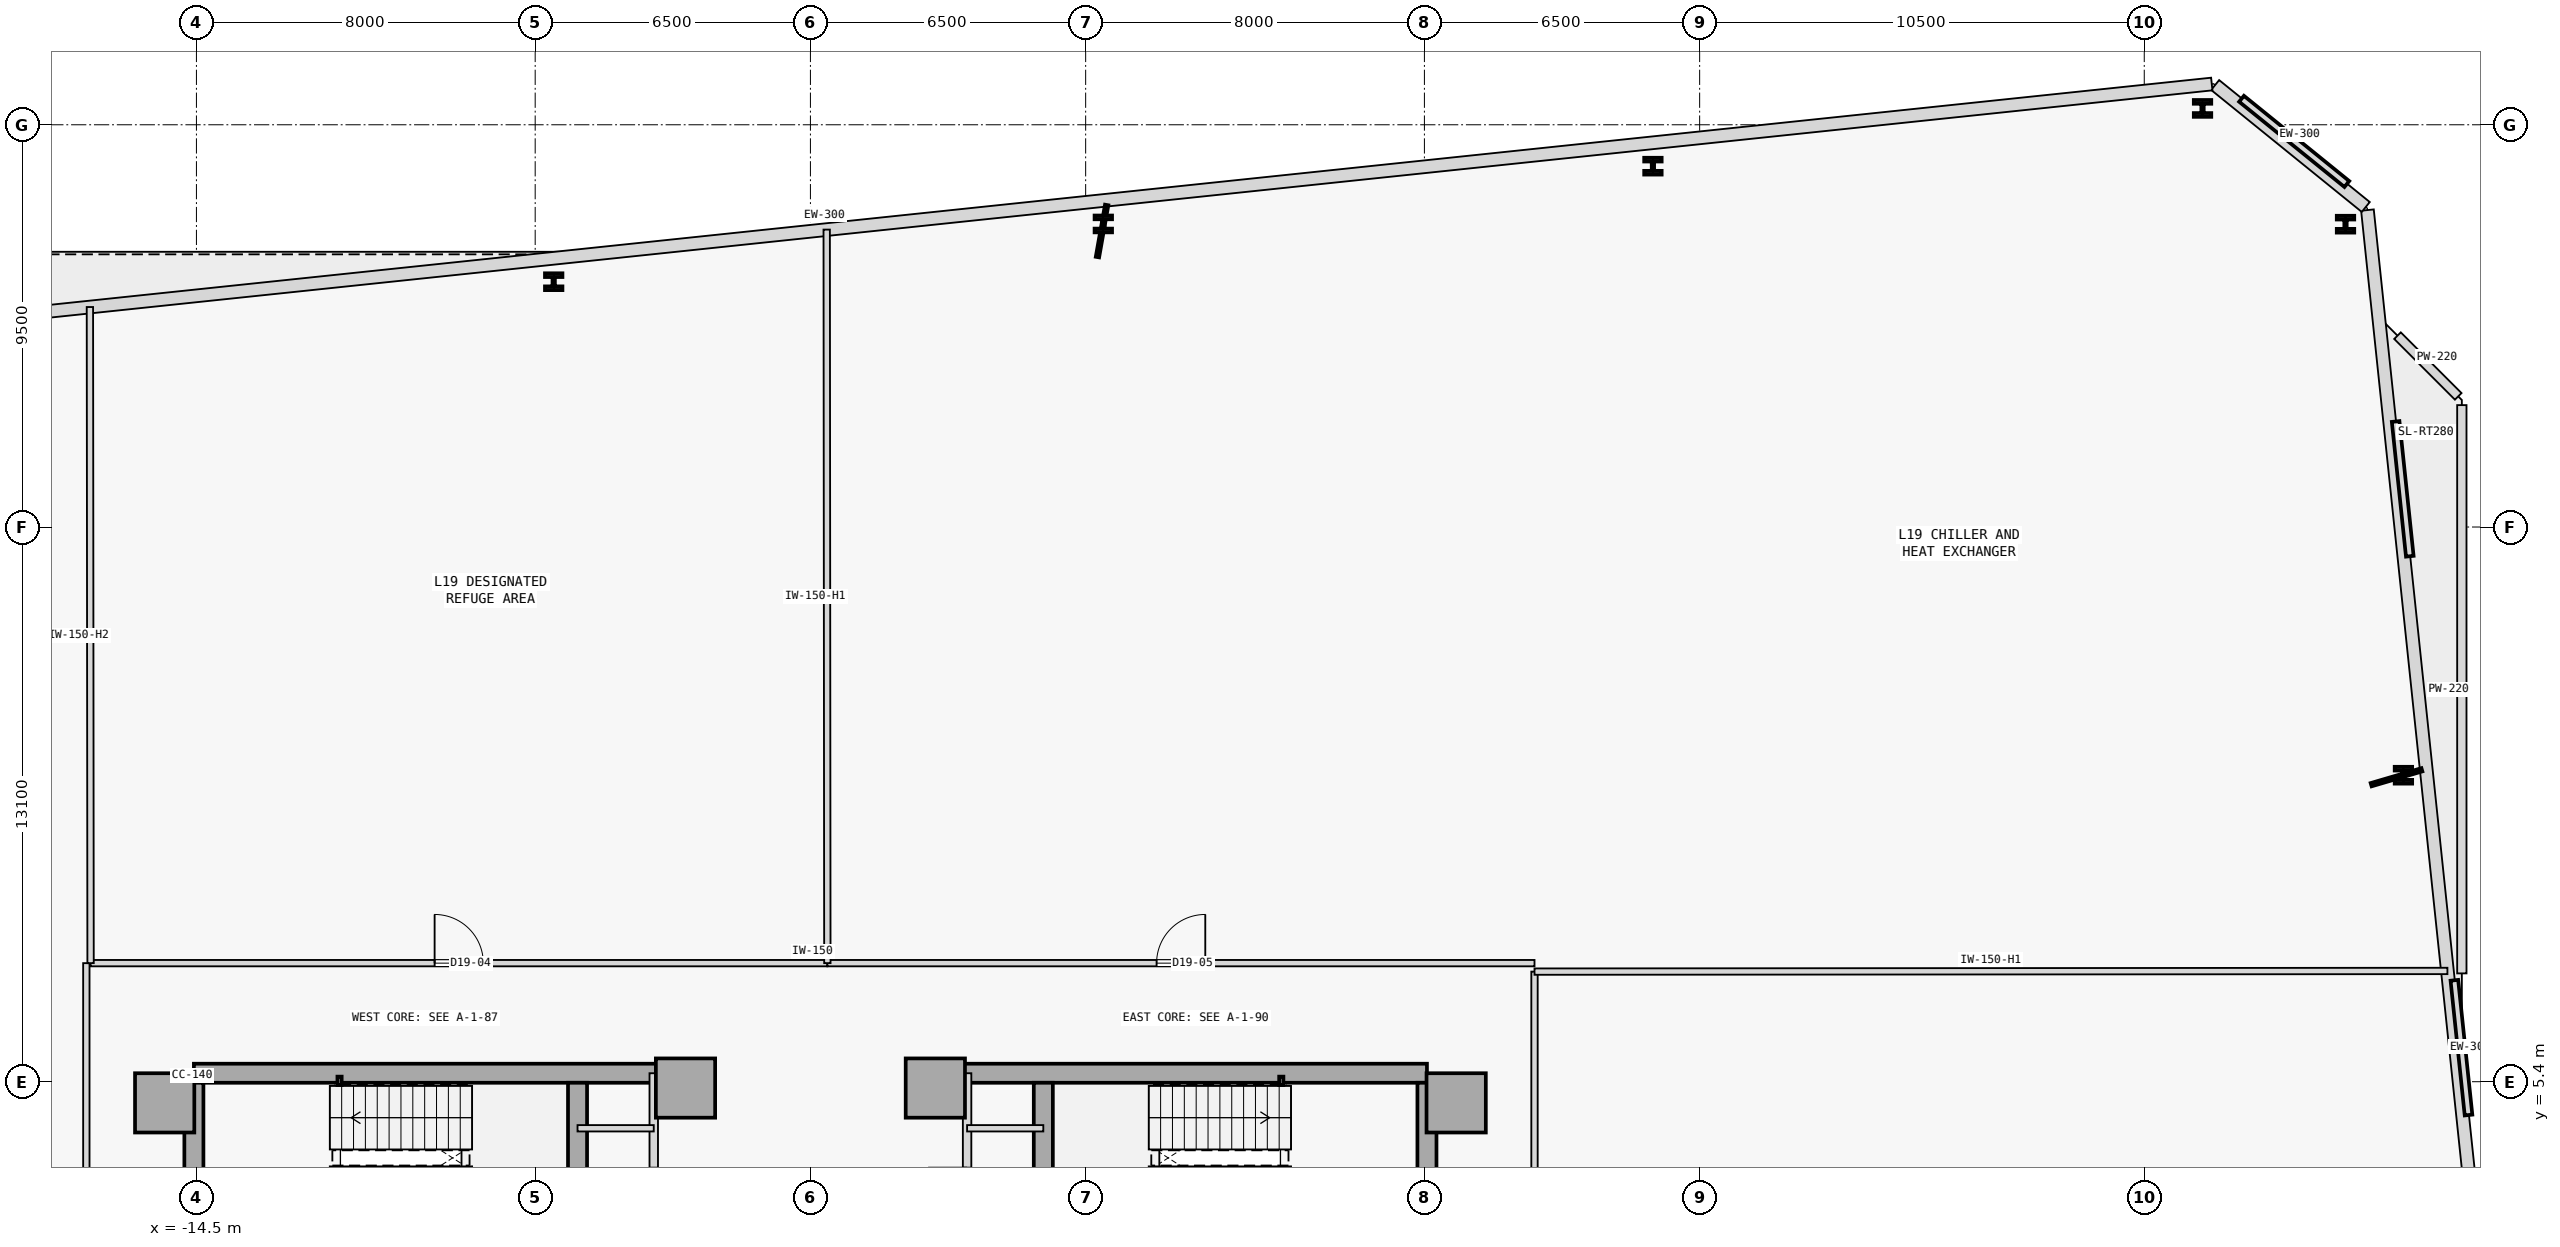
"""IFC4 building model, lengths in metres.
Left out: names, types, materials, properties, quantities, classifications, styles, units other than length and angle.
Written with IfcOpenShell. Run it as: python <this file> out.ifc"""

import sys

from ifc_helpers import new_model, si_unit, direction, frame, frame_2d, origin, origin_2d, place, context, subcontext, project, spatial, rectangle, hollow_rectangle, i_section, extrude, element, fill, save


model = new_model("IFC4")
c1 = context("Model", 3, precision=1e-05, world=origin(), true_north=direction((0.0, 1.0)))
c2 = subcontext(c1, "Body", "Model", "MODEL_VIEW")
j1 = project(units=[si_unit("LENGTHUNIT", "METRE"), si_unit("PLANEANGLEUNIT", "RADIAN")], contexts=[c1])
p1 = place(None, origin())
s1 = spatial("IfcSite", under=j1, at=p1, CompositionType="ELEMENT")
p2 = place(p1, origin())
s2 = spatial("IfcBuilding", under=s1, at=p2, CompositionType="ELEMENT")
p3 = place(p2, frame((0.0, 0.0, 78.8)))
s3 = spatial("IfcBuildingStorey", under=s2, at=p3, CompositionType="ELEMENT", Elevation=78.8)
for number, where, z_axis, x_axis in (
    (1, (-15.25, 4.9, 0.0), (0.0, 0.0, 1.0), (1.0, 0.0, 0.0)),
    (2, (-2.95, 5.25, 0.0), (0.0, 0.0, 1.0), (1.0, 0.0, 0.0)),
    (3, (15.25, 4.9, 0.0), (0.0, 0.0, 1.0), (1.0, 0.0, 0.0)),
    (4, (2.95, 5.25, 0.0), (0.0, 0.0, 1.0), (1.0, 0.0, 0.0)),
):
    element("IfcColumn", number, at=place(p3, frame(where, z_axis=z_axis, x_axis=x_axis)), inside=s3, PredefinedType="COLUMN", context=c2, shape_type="SweptSolid", body=[
        extrude(rectangle(XDim=1.4, YDim=1.4, at=origin_2d()), origin(), (0.0, 0.0, 1.0), 4.4),
    ])
p4 = place(p3, frame((-14.56, 5.6, 0.0), z_axis=(0.0, 0.0, 1.0), x_axis=(1.0, 0.0, 0.0)))
e5 = element("IfcWall", 5, at=p4, inside=s3, PredefinedType="SHEAR", context=c2, shape_type="SweptSolid", body=[
    extrude(rectangle(XDim=11.41, YDim=0.45, at=frame_2d((5.705, 0.0))), origin(), (0.0, 0.0, 1.0), 4.15),
])
p5 = place(p3, frame((-14.56, -5.375, 0.0), z_axis=(0.0, 0.0, 1.0), x_axis=(0.0, 1.0, 0.0)))
e6 = element("IfcWall", 6, at=p5, inside=s3, PredefinedType="SHEAR", context=c2, shape_type="SweptSolid", body=[
    extrude(rectangle(XDim=10.75, YDim=0.45, at=frame_2d((5.375, 0.0))), origin(), (0.0, 0.0, 1.0), 4.15),
])
p6 = place(p3, frame((-5.5, 2.15, 0.0), z_axis=(0.0, 0.0, 1.0), x_axis=(0.0, 1.0, 0.0)))
e7 = element("IfcWall", 7, at=p6, inside=s3, PredefinedType="SHEAR", context=c2, shape_type="SweptSolid", body=[
    extrude(rectangle(XDim=3.225, YDim=0.45, at=frame_2d((1.613, 0.0))), origin(), (0.0, 0.0, 1.0), 4.15),
])
p7 = place(p3, frame((3.15, 5.6, 0.0), z_axis=(0.0, 0.0, 1.0), x_axis=(1.0, 0.0, 0.0)))
e8 = element("IfcWall", 8, at=p7, inside=s3, PredefinedType="SHEAR", context=c2, shape_type="SweptSolid", body=[
    extrude(rectangle(XDim=11.41, YDim=0.45, at=frame_2d((5.705, 0.0))), origin(), (0.0, 0.0, 1.0), 4.15),
])
p8 = place(p3, frame((14.56, -5.375, 0.0), z_axis=(0.0, 0.0, 1.0), x_axis=(0.0, 1.0, 0.0)))
e9 = element("IfcWall", 9, at=p8, inside=s3, PredefinedType="SHEAR", context=c2, shape_type="SweptSolid", body=[
    extrude(rectangle(XDim=10.75, YDim=0.45, at=frame_2d((5.375, 0.0))), origin(), (0.0, 0.0, 1.0), 4.15),
])
p9 = place(p3, frame((5.5, 2.15, 0.0), z_axis=(0.0, 0.0, 1.0), x_axis=(0.0, 1.0, 0.0)))
e10 = element("IfcWall", 10, at=p9, inside=s3, PredefinedType="SHEAR", context=c2, shape_type="SweptSolid", body=[
    extrude(rectangle(XDim=3.225, YDim=0.45, at=frame_2d((1.613, 0.0))), origin(), (0.0, 0.0, 1.0), 4.15),
])
for number, where, z_axis, x_axis in (
    (11, (-11.12, 5.42, 0.0), (0.0, 0.0, 1.0), (1.0, 0.0, 0.0)),
    (12, (11.12, 5.42, 0.0), (0.0, 0.0, 1.0), (1.0, 0.0, 0.0)),
):
    element("IfcColumn", number, at=place(p3, frame(where, z_axis=z_axis, x_axis=x_axis)), inside=s3, PredefinedType="COLUMN", context=c2, shape_type="SweptSolid", body=[
        extrude(hollow_rectangle(XDim=0.1, YDim=0.2, WallThickness=0.008, at=origin_2d()), origin(), (0.0, 0.0, 1.0), 4.4),
    ])
for number, where, z_axis, x_axis in (
    (13, (37.621, 12.638, 0.0), (0.0, 0.0, 1.0), (1.0, 0.0, 0.0)),
    (14, (36.253, 25.652, 0.0), (0.0, 0.0, 1.0), (1.0, 0.0, 0.0)),
    (15, (32.876, 28.386, 0.0), (0.0, 0.0, 1.0), (1.0, 0.0, 0.0)),
    (16, (19.897, 27.022, 0.0), (0.0, 0.0, 1.0), (1.0, 0.0, 0.0)),
    (17, (6.917, 25.658, 0.0), (0.0, 0.0, 1.0), (1.0, 0.0, 0.0)),
    (18, (-6.062, 24.293, 0.0), (0.0, 0.0, 1.0), (1.0, 0.0, 0.0)),
):
    element("IfcColumn", number, at=place(p3, frame(where, z_axis=z_axis, x_axis=x_axis)), inside=s3, PredefinedType="COLUMN", context=c2, shape_type="SweptSolid", body=[
        extrude(i_section(OverallWidth=0.413, OverallDepth=0.398, WebThickness=0.056, FlangeThickness=0.089, FilletRadius=0.015, at=origin_2d()), origin(), (0.0, 0.0, 1.0), 4.4),
    ])
p10 = place(p3, frame((39.0, 7.958, 0.0), z_axis=(0.0, 0.0, 1.0), x_axis=(0.0, 1.0, 0.0)))
e19 = element("IfcWall", 19, at=p10, inside=s3, PredefinedType="PARAPET", context=c2, shape_type="SweptSolid", body=[
    extrude(rectangle(XDim=13.421, YDim=0.22, at=frame_2d((6.71, 0.0))), origin(), (0.0, 0.0, 1.0), 1.2),
])
p11 = place(p3, frame((38.914, 21.586, 0.0), z_axis=(0.0, 0.0, 1.0), x_axis=(-0.707106781187, 0.707106781187, 0.0)))
e20 = element("IfcWall", 20, at=p11, inside=s3, PredefinedType="PARAPET", context=c2, shape_type="SweptSolid", body=[
    extrude(rectangle(XDim=2.027, YDim=0.22, at=frame_2d((1.014, 0.0))), origin(), (0.0, 0.0, 1.0), 1.2),
])
p12 = place(p3, frame((40.932, -13.607, 0.0), z_axis=(0.0, 0.0, 1.0), x_axis=(-0.104531231484, 0.994521604413, 0.0)))
e21 = element("IfcWall", 21, at=p12, inside=s3, PredefinedType="STANDARD", context=c2, shape_type="SweptSolid", body=[
    extrude(rectangle(XDim=39.81, YDim=0.3, at=frame_2d((19.905, 0.0))), origin(), (0.0, 0.0, 1.0), 4.15),
])
p13 = place(p3, frame((36.731, 26.058, 0.0), z_axis=(0.0, 0.0, 1.0), x_axis=(-0.777139271876, 0.629328651904, 0.0)))
e22 = element("IfcWall", 22, at=p13, inside=s3, PredefinedType="STANDARD", context=c2, shape_type="SweptSolid", body=[
    extrude(rectangle(XDim=4.577, YDim=0.3, at=frame_2d((2.289, 0.0))), origin(), (0.0, 0.0, 1.0), 4.15),
])
p14 = place(p3, frame((33.094, 28.962, 0.0), z_axis=(0.0, 0.0, 1.0), x_axis=(-0.994521682676, -0.104530486878, 0.0)))
e23 = element("IfcWall", 23, at=p14, inside=s3, PredefinedType="STANDARD", context=c2, shape_type="SweptSolid", body=[
    extrude(rectangle(XDim=65.81, YDim=0.3, at=frame_2d((32.905, 0.0))), origin(), (0.0, 0.0, 1.0), 4.15),
])
p15 = place(p14, frame((61.35, 0.0, 0.0)))
e24 = element("IfcOpeningElement", 24, at=p15, cuts=e23, PredefinedType="OPENING", context=c2, shape_type="SweptSolid", body=[
    extrude(rectangle(XDim=1.1, YDim=2.2, at=frame_2d((0.55, 1.1))), frame((0.0, 0.16, 0.0), z_axis=(0.0, -1.0, 0.0), x_axis=(1.0, 0.0, 0.0)), (0.0, 0.0, 1.0), 0.32),
])
p16 = place(p3, frame((-3.7, -1.15, 0.0), z_axis=(0.0, 0.0, 1.0), x_axis=(0.0, 1.0, 0.0)))
e25 = element("IfcWall", 25, at=p16, inside=s3, PredefinedType="STANDARD", context=c2, shape_type="SweptSolid", body=[
    extrude(rectangle(XDim=6.75, YDim=0.2, at=frame_2d((3.375, 0.0))), origin(), (0.0, 0.0, 1.0), 4.15),
])
p17 = place(p16, frame((3.6, 0.0, 0.0)))
e26 = element("IfcOpeningElement", 26, at=p17, cuts=e25, PredefinedType="OPENING", context=c2, shape_type="SweptSolid", body=[
    extrude(rectangle(XDim=0.92, YDim=2.15, at=frame_2d((0.46, 1.075))), frame((0.0, 0.11, 0.0), z_axis=(0.0, -1.0, 0.0), x_axis=(1.0, 0.0, 0.0)), (0.0, 0.0, 1.0), 0.22),
])
p18 = place(p16, frame((0.85, 0.0, 0.0)))
e27 = element("IfcOpeningElement", 27, at=p18, cuts=e25, PredefinedType="OPENING", context=c2, shape_type="SweptSolid", body=[
    extrude(rectangle(XDim=0.9, YDim=2.15, at=frame_2d((0.45, 1.075))), frame((0.0, 0.11, 0.0), z_axis=(0.0, -1.0, 0.0), x_axis=(1.0, 0.0, 0.0)), (0.0, 0.0, 1.0), 0.22),
])
p19 = place(p3, frame((3.7, -1.15, 0.0), z_axis=(0.0, 0.0, 1.0), x_axis=(0.0, 1.0, 0.0)))
e28 = element("IfcWall", 28, at=p19, inside=s3, PredefinedType="STANDARD", context=c2, shape_type="SweptSolid", body=[
    extrude(rectangle(XDim=6.75, YDim=0.2, at=frame_2d((3.375, 0.0))), origin(), (0.0, 0.0, 1.0), 4.15),
])
p20 = place(p19, frame((3.6, 0.0, 0.0)))
e29 = element("IfcOpeningElement", 29, at=p20, cuts=e28, PredefinedType="OPENING", context=c2, shape_type="SweptSolid", body=[
    extrude(rectangle(XDim=0.92, YDim=2.15, at=frame_2d((0.46, 1.075))), frame((0.0, 0.11, 0.0), z_axis=(0.0, -1.0, 0.0), x_axis=(1.0, 0.0, 0.0)), (0.0, 0.0, 1.0), 0.22),
])
for number, where, z_axis, x_axis in (
    (30, (-5.5, 4.3, 0.0), (0.0, 0.0, 1.0), (1.0, 0.0, 0.0)),
    (31, (3.7, 4.3, 0.0), (0.0, 0.0, 1.0), (1.0, 0.0, 0.0)),
):
    element("IfcWall", number, at=place(p3, frame(where, z_axis=z_axis, x_axis=x_axis)), inside=s3, PredefinedType="PARTITIONING", context=c2, shape_type="SweptSolid", body=[
        extrude(rectangle(XDim=1.8, YDim=0.15, at=frame_2d((0.9, 0.0))), origin(), (0.0, 0.0, 1.0), 4.15),
    ])
p21 = place(p3, frame((-17.0, 8.2, 0.0), z_axis=(0.0, 0.0, 1.0), x_axis=(1.0, 0.0, 0.0)))
e32 = element("IfcWall", 32, at=p21, inside=s3, PredefinedType="PARTITIONING", context=c2, shape_type="SweptSolid", body=[
    extrude(rectangle(XDim=17.4, YDim=0.15, at=frame_2d((8.7, 0.0))), origin(), (0.0, 0.0, 1.0), 4.15),
])
p22 = place(p21, frame((8.125, 0.0, 0.0)))
e33 = element("IfcOpeningElement", 33, at=p22, cuts=e32, PredefinedType="OPENING", context=c2, shape_type="SweptSolid", body=[
    extrude(rectangle(XDim=1.15, YDim=2.15, at=frame_2d((0.575, 1.075))), frame((0.0, 0.085, 0.0), z_axis=(0.0, -1.0, 0.0), x_axis=(1.0, 0.0, 0.0)), (0.0, 0.0, 1.0), 0.17),
])
p23 = place(p3, frame((0.4, 8.2, 0.0), z_axis=(0.0, 0.0, 1.0), x_axis=(1.0, 0.0, 0.0)))
e34 = element("IfcWall", 34, at=p23, inside=s3, PredefinedType="PARTITIONING", context=c2, shape_type="SweptSolid", body=[
    extrude(rectangle(XDim=16.7, YDim=0.15, at=frame_2d((8.35, 0.0))), origin(), (0.0, 0.0, 1.0), 4.15),
])
p24 = place(p23, frame((7.775, 0.0, 0.0)))
e35 = element("IfcOpeningElement", 35, at=p24, cuts=e34, PredefinedType="OPENING", context=c2, shape_type="SweptSolid", body=[
    extrude(rectangle(XDim=1.15, YDim=2.15, at=frame_2d((0.575, 1.075))), frame((0.0, 0.085, 0.0), z_axis=(0.0, -1.0, 0.0), x_axis=(1.0, 0.0, 0.0)), (0.0, 0.0, 1.0), 0.17),
])
p25 = place(p3, frame((-17.1, -8.2, 0.0), z_axis=(0.0, 0.0, 1.0), x_axis=(0.0, 1.0, 0.0)))
e36 = element("IfcWall", 36, at=p25, inside=s3, PredefinedType="PARTITIONING", context=c2, shape_type="SweptSolid", body=[
    extrude(rectangle(XDim=16.4, YDim=0.15, at=frame_2d((8.2, 0.0))), origin(), (0.0, 0.0, 1.0), 4.15),
])
p26 = place(p25, frame((5.165, 0.0, 0.0)))
e37 = element("IfcOpeningElement", 37, at=p26, cuts=e36, PredefinedType="OPENING", context=c2, shape_type="SweptSolid", body=[
    extrude(rectangle(XDim=1.15, YDim=2.15, at=frame_2d((0.575, 1.075))), frame((0.0, 0.085, 0.0), z_axis=(0.0, -1.0, 0.0), x_axis=(1.0, 0.0, 0.0)), (0.0, 0.0, 1.0), 0.17),
])
p27 = place(p3, frame((17.1, -8.0, 0.0), z_axis=(0.0, 0.0, 1.0), x_axis=(0.0, 1.0, 0.0)))
e38 = element("IfcWall", 38, at=p27, inside=s3, PredefinedType="PARTITIONING", context=c2, shape_type="SweptSolid", body=[
    extrude(rectangle(XDim=16.0, YDim=0.15, at=frame_2d((8.0, 0.0))), origin(), (0.0, 0.0, 1.0), 4.15),
])
p28 = place(p27, frame((5.025, 0.0, 0.0)))
e39 = element("IfcOpeningElement", 39, at=p28, cuts=e38, PredefinedType="OPENING", context=c2, shape_type="SweptSolid", body=[
    extrude(rectangle(XDim=1.15, YDim=2.15, at=frame_2d((0.575, 1.075))), frame((0.0, 0.085, 0.0), z_axis=(0.0, -1.0, 0.0), x_axis=(1.0, 0.0, 0.0)), (0.0, 0.0, 1.0), 0.17),
])
p29 = place(p3, frame((0.4, 8.2, 0.0), z_axis=(0.0, 0.0, 1.0), x_axis=(-0.000901916206, 0.999999593273, 0.0)))
e40 = element("IfcWall", 40, at=p29, inside=s3, PredefinedType="PARTITIONING", context=c2, shape_type="SweptSolid", body=[
    extrude(rectangle(XDim=17.324, YDim=0.15, at=frame_2d((8.662, 0.0))), origin(), (0.0, 0.0, 1.0), 3.7),
])
p30 = place(p3, frame((-17.0, 8.2, 0.0), z_axis=(0.0, 0.0, 1.0), x_axis=(-0.001008365776, 0.999999491599, 0.0)))
e41 = element("IfcWall", 41, at=p30, inside=s3, PredefinedType="PARTITIONING", context=c2, shape_type="SweptSolid", body=[
    extrude(rectangle(XDim=15.495, YDim=0.15, at=frame_2d((7.748, 0.0))), origin(), (0.0, 0.0, 1.0), 3.55),
])
p31 = place(p3, frame((17.1, 8.0, 0.0), z_axis=(0.0, 0.0, 1.0), x_axis=(0.999999737373, 0.000724744167, 0.0)))
e42 = element("IfcWall", 42, at=p31, inside=s3, PredefinedType="PARTITIONING", context=c2, shape_type="SweptSolid", body=[
    extrude(rectangle(XDim=21.559, YDim=0.15, at=frame_2d((10.78, 0.0))), origin(), (0.0, 0.0, 1.0), 3.7),
])
p32 = place(p22, origin())
e43 = element("IfcDoor", 43, at=p32, inside=s3, OperationType="SINGLE_SWING_LEFT", PredefinedType="DOOR", context=c2, shape_type="SweptSolid", body=[
    extrude(rectangle(XDim=1.15, YDim=2.15, at=frame_2d((0.575, 1.075))), frame((0.0, 0.025, 0.0), z_axis=(0.0, -1.0, 0.0), x_axis=(1.0, 0.0, 0.0)), (0.0, 0.0, 1.0), 0.05),
])
fill(e33, e43)
p33 = place(p24, origin())
e44 = element("IfcDoor", 44, at=p33, inside=s3, OperationType="SINGLE_SWING_RIGHT", PredefinedType="DOOR", context=c2, shape_type="SweptSolid", body=[
    extrude(rectangle(XDim=1.15, YDim=2.15, at=frame_2d((0.575, 1.075))), frame((0.0, 0.025, 0.0), z_axis=(0.0, -1.0, 0.0), x_axis=(1.0, 0.0, 0.0)), (0.0, 0.0, 1.0), 0.05),
])
fill(e35, e44)
save(model, sys.argv[1])
